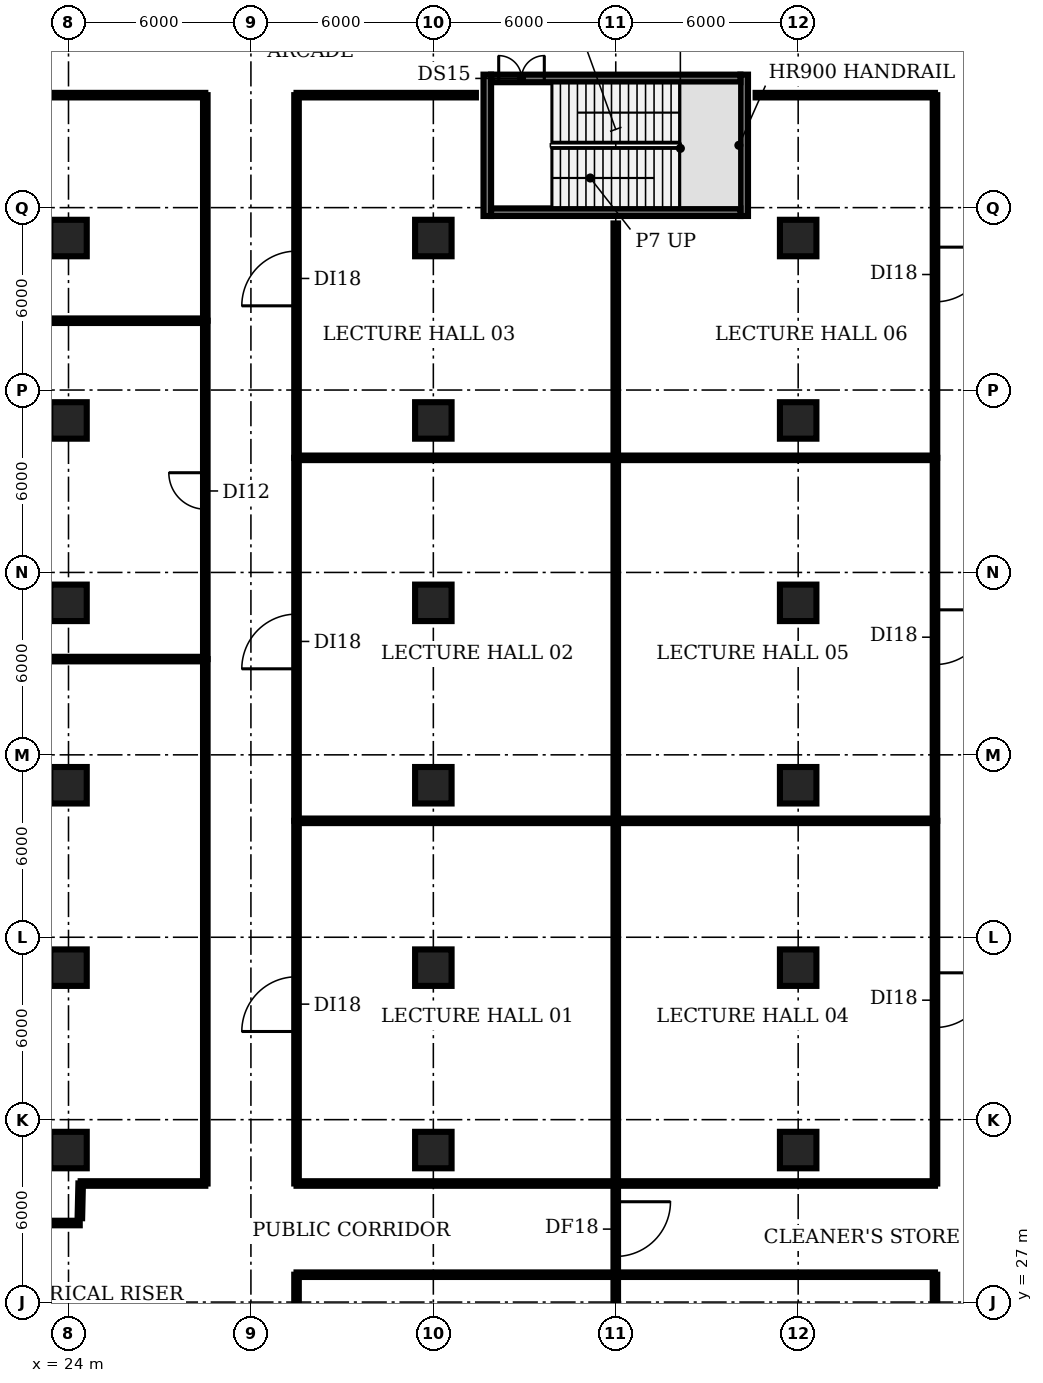
"""IFC4 building model, lengths in metres.
Left out: names, types, materials, properties, quantities, classifications, styles, units other than length and angle.
Written with IfcOpenShell. Run it as: python <this file> out.ifc"""

import sys

from ifc_helpers import new_model, si_unit, direction, frame, frame_2d, origin, origin_2d, place, context, subcontext, project, spatial, rectangle, extrude, element, fill, save


model = new_model("IFC4")
c1 = context("Model", 3, precision=1e-05, world=origin(), true_north=direction((0.0, 1.0)))
c2 = subcontext(c1, "Body", "Model", "MODEL_VIEW")
j1 = project(units=[si_unit("LENGTHUNIT", "METRE"), si_unit("PLANEANGLEUNIT", "RADIAN")], contexts=[c1])
p1 = place(None, origin())
s1 = spatial("IfcSite", under=j1, at=p1, CompositionType="ELEMENT")
p2 = place(p1, origin())
s2 = spatial("IfcBuilding", under=s1, at=p2, CompositionType="ELEMENT")
p3 = place(p2, origin())
s3 = spatial("IfcBuildingStorey", under=s2, at=p3, CompositionType="ELEMENT", Elevation=0.0)
for number, where, z_axis, x_axis in (
    (1, (24.0, 32.0, 0.0), (0.0, 0.0, 1.0), (1.0, 0.0, 0.0)),
    (2, (24.0, 38.0, 0.0), (0.0, 0.0, 1.0), (1.0, 0.0, 0.0)),
    (3, (24.0, 44.0, 0.0), (0.0, 0.0, 1.0), (1.0, 0.0, 0.0)),
    (4, (24.0, 50.0, 0.0), (0.0, 0.0, 1.0), (1.0, 0.0, 0.0)),
    (5, (24.0, 56.0, 0.0), (0.0, 0.0, 1.0), (1.0, 0.0, 0.0)),
    (6, (24.0, 62.0, 0.0), (0.0, 0.0, 1.0), (1.0, 0.0, 0.0)),
    (7, (36.0, 32.0, 0.0), (0.0, 0.0, 1.0), (1.0, 0.0, 0.0)),
    (8, (36.0, 38.0, 0.0), (0.0, 0.0, 1.0), (1.0, 0.0, 0.0)),
    (9, (36.0, 44.0, 0.0), (0.0, 0.0, 1.0), (1.0, 0.0, 0.0)),
    (10, (36.0, 50.0, 0.0), (0.0, 0.0, 1.0), (1.0, 0.0, 0.0)),
    (11, (36.0, 56.0, 0.0), (0.0, 0.0, 1.0), (1.0, 0.0, 0.0)),
    (12, (36.0, 62.0, 0.0), (0.0, 0.0, 1.0), (1.0, 0.0, 0.0)),
    (13, (48.0, 32.0, 0.0), (0.0, 0.0, 1.0), (1.0, 0.0, 0.0)),
    (14, (48.0, 38.0, 0.0), (0.0, 0.0, 1.0), (1.0, 0.0, 0.0)),
    (15, (48.0, 44.0, 0.0), (0.0, 0.0, 1.0), (1.0, 0.0, 0.0)),
    (16, (48.0, 50.0, 0.0), (0.0, 0.0, 1.0), (1.0, 0.0, 0.0)),
    (17, (48.0, 56.0, 0.0), (0.0, 0.0, 1.0), (1.0, 0.0, 0.0)),
    (18, (48.0, 62.0, 0.0), (0.0, 0.0, 1.0), (1.0, 0.0, 0.0)),
):
    element("IfcColumn", number, at=place(p3, frame(where, z_axis=z_axis, x_axis=x_axis)), inside=s3, PredefinedType="COLUMN", context=c2, shape_type="SweptSolid", body=[
        extrude(rectangle(XDim=1.2, YDim=1.2, at=origin_2d()), origin(), (0.0, 0.0, 1.0), 5.65),
    ])
for number, where, z_axis, x_axis in (
    (19, (37.775, 62.725, 0.0), (0.0, 0.0, 1.0), (0.0, 1.0, 0.0)),
    (20, (46.225, 62.725, 0.0), (0.0, 0.0, 1.0), (0.0, 1.0, 0.0)),
):
    element("IfcWall", number, at=place(p3, frame(where, z_axis=z_axis, x_axis=x_axis)), inside=s3, PredefinedType="SHEAR", context=c2, shape_type="SweptSolid", body=[
        extrude(rectangle(XDim=4.65, YDim=0.25, at=frame_2d((2.325, 0.0))), origin(), (0.0, 0.0, 1.0), 5.65),
    ])
p4 = place(p3, frame((37.9, 62.85, 0.0), z_axis=(0.0, 0.0, 1.0), x_axis=(1.0, 0.0, 0.0)))
e21 = element("IfcWall", 21, at=p4, inside=s3, PredefinedType="SHEAR", context=c2, shape_type="SweptSolid", body=[
    extrude(rectangle(XDim=8.2, YDim=0.25, at=frame_2d((4.1, 0.0))), origin(), (0.0, 0.0, 1.0), 5.65),
])
p5 = place(p3, frame((37.9, 67.25, 0.0), z_axis=(0.0, 0.0, 1.0), x_axis=(1.0, 0.0, 0.0)))
e22 = element("IfcWall", 22, at=p5, inside=s3, PredefinedType="SHEAR", context=c2, shape_type="SweptSolid", body=[
    extrude(rectangle(XDim=8.2, YDim=0.25, at=frame_2d((4.1, 0.0))), origin(), (0.0, 0.0, 1.0), 5.65),
])
p6 = place(p5, frame((0.25, 0.0, 0.0)))
e23 = element("IfcOpeningElement", 23, at=p6, cuts=e22, PredefinedType="OPENING", context=c2, shape_type="SweptSolid", body=[
    extrude(rectangle(XDim=1.5, YDim=2.1, at=frame_2d((0.75, 1.05))), frame((0.0, 0.135, 0.0), z_axis=(0.0, -1.0, 0.0), x_axis=(1.0, 0.0, 0.0)), (0.0, 0.0, 1.0), 0.27),
])
p7 = place(p3, frame((-3.7, 48.15, 0.0), z_axis=(0.0, 0.0, 1.0), x_axis=(1.0, 0.0, 0.0)))
e24 = element("IfcWall", 24, at=p7, inside=s3, PredefinedType="PARTITIONING", context=c2, shape_type="SweptSolid", body=[
    extrude(rectangle(XDim=32.2, YDim=0.15, at=frame_2d((16.1, 0.0))), origin(), (0.0, 0.0, 1.0), 4.53),
])
p8 = place(p3, frame((5.4, 59.28, 0.0), z_axis=(0.0, 0.0, 1.0), x_axis=(1.0, 0.0, 0.0)))
e25 = element("IfcWall", 25, at=p8, inside=s3, PredefinedType="PARTITIONING", context=c2, shape_type="SweptSolid", body=[
    extrude(rectangle(XDim=23.1, YDim=0.15, at=frame_2d((11.55, 0.0))), origin(), (0.0, 0.0, 1.0), 4.53),
])
p9 = place(p3, frame((5.63, 29.6, 0.0), z_axis=(0.0, 0.0, 1.0), x_axis=(1.0, 0.0, 0.0)))
e26 = element("IfcWall", 26, at=p9, inside=s3, PredefinedType="PARTITIONING", context=c2, shape_type="SweptSolid", body=[
    extrude(rectangle(XDim=18.74, YDim=0.15, at=frame_2d((9.37, 0.0))), origin(), (0.0, 0.0, 1.0), 4.53),
])
p10 = place(p9, frame((8.34, 0.0, 0.0)))
e27 = element("IfcOpeningElement", 27, at=p10, cuts=e26, PredefinedType="OPENING", context=c2, shape_type="SweptSolid", body=[
    extrude(rectangle(XDim=1.8, YDim=2.1, at=frame_2d((0.9, 1.05))), frame((0.0, 0.085, 0.0), z_axis=(0.0, -1.0, 0.0), x_axis=(1.0, 0.0, 0.0)), (0.0, 0.0, 1.0), 0.17),
])
p11 = place(p3, frame((24.374, 29.76, 0.0), z_axis=(0.0, 0.0, 1.0), x_axis=(0.022906193834, 0.99973761872, 0.0)))
e28 = element("IfcWall", 28, at=p11, inside=s3, PredefinedType="PARTITIONING", context=c2, shape_type="SweptSolid", body=[
    extrude(rectangle(XDim=1.14, YDim=0.15, at=frame_2d((0.57, 0.0))), origin(), (0.0, 0.0, 1.0), 4.53),
])
p12 = place(p3, frame((24.4, 30.9, 0.0), z_axis=(0.0, 0.0, 1.0), x_axis=(1.0, 0.0, 0.0)))
e29 = element("IfcWall", 29, at=p12, inside=s3, PredefinedType="PARTITIONING", context=c2, shape_type="SweptSolid", body=[
    extrude(rectangle(XDim=4.1, YDim=0.15, at=frame_2d((2.05, 0.0))), origin(), (0.0, 0.0, 1.0), 4.53),
])
p13 = place(p3, frame((28.5, 30.9, 0.0), z_axis=(0.0, 0.0, 1.0), x_axis=(0.0, 1.0, 0.0)))
e30 = element("IfcWall", 30, at=p13, inside=s3, PredefinedType="PARTITIONING", context=c2, shape_type="SweptSolid", body=[
    extrude(rectangle(XDim=17.25, YDim=0.15, at=frame_2d((8.625, 0.0))), origin(), (0.0, 0.0, 1.0), 4.53),
])
p14 = place(p3, frame((28.5, 48.15, 0.0), z_axis=(0.0, 0.0, 1.0), x_axis=(0.0, 1.0, 0.0)))
e31 = element("IfcWall", 31, at=p14, inside=s3, PredefinedType="PARTITIONING", context=c2, shape_type="SweptSolid", body=[
    extrude(rectangle(XDim=11.13, YDim=0.15, at=frame_2d((5.565, 0.0))), origin(), (0.0, 0.0, 1.0), 4.53),
])
p15 = place(p14, frame((4.93, 0.0, 0.0)))
e32 = element("IfcOpeningElement", 32, at=p15, cuts=e31, PredefinedType="OPENING", context=c2, shape_type="SweptSolid", body=[
    extrude(rectangle(XDim=1.2, YDim=2.1, at=frame_2d((0.6, 1.05))), frame((0.0, 0.085, 0.0), z_axis=(0.0, -1.0, 0.0), x_axis=(1.0, 0.0, 0.0)), (0.0, 0.0, 1.0), 0.17),
])
p16 = place(p3, frame((28.5, 59.28, 0.0), z_axis=(0.0, 0.0, 1.0), x_axis=(0.0, 1.0, 0.0)))
e33 = element("IfcWall", 33, at=p16, inside=s3, PredefinedType="PARTITIONING", context=c2, shape_type="SweptSolid", body=[
    extrude(rectangle(XDim=7.42, YDim=0.15, at=frame_2d((3.71, 0.0))), origin(), (0.0, 0.0, 1.0), 4.53),
])
p17 = place(p3, frame((28.5, 66.7, 0.0), z_axis=(0.0, 0.0, 1.0), x_axis=(-1.0, 0.0, 0.0)))
e34 = element("IfcWall", 34, at=p17, inside=s3, PredefinedType="PARTITIONING", context=c2, shape_type="SweptSolid", body=[
    extrude(rectangle(XDim=27.55, YDim=0.15, at=frame_2d((13.775, 0.0))), origin(), (0.0, 0.0, 1.0), 4.53),
])
p18 = place(p17, frame((13.25, 0.0, 0.0)))
e35 = element("IfcOpeningElement", 35, at=p18, cuts=e34, PredefinedType="OPENING", context=c2, shape_type="SweptSolid", body=[
    extrude(rectangle(XDim=1.2, YDim=2.1, at=frame_2d((0.6, 1.05))), frame((0.0, 0.085, 0.0), z_axis=(0.0, -1.0, 0.0), x_axis=(1.0, 0.0, 0.0)), (0.0, 0.0, 1.0), 0.17),
])
p19 = place(p3, frame((31.5, 19.52, 0.0), z_axis=(0.0, 0.0, 1.0), x_axis=(0.0, 1.0, 0.0)))
e36 = element("IfcWall", 36, at=p19, inside=s3, PredefinedType="PARTITIONING", context=c2, shape_type="SweptSolid", body=[
    extrude(rectangle(XDim=8.38, YDim=0.15, at=frame_2d((4.19, 0.0))), origin(), (0.0, 0.0, 1.0), 4.53),
])
p20 = place(p3, frame((31.5, 27.9, 0.0), z_axis=(0.0, 0.0, 1.0), x_axis=(1.0, 0.0, 0.0)))
e37 = element("IfcWall", 37, at=p20, inside=s3, PredefinedType="PARTITIONING", context=c2, shape_type="SweptSolid", body=[
    extrude(rectangle(XDim=21.0, YDim=0.15, at=frame_2d((10.5, 0.0))), origin(), (0.0, 0.0, 1.0), 4.53),
])
p21 = place(p3, frame((31.5, 30.9, 0.0), z_axis=(0.0, 0.0, 1.0), x_axis=(0.0, 1.0, 0.0)))
e38 = element("IfcWall", 38, at=p21, inside=s3, PredefinedType="PARTITIONING", context=c2, shape_type="SweptSolid", body=[
    extrude(rectangle(XDim=11.93, YDim=0.15, at=frame_2d((5.965, 0.0))), origin(), (0.0, 0.0, 1.0), 4.53),
])
p22 = place(p21, frame((5.0, 0.0, 0.0)))
e39 = element("IfcOpeningElement", 39, at=p22, cuts=e38, PredefinedType="OPENING", context=c2, shape_type="SweptSolid", body=[
    extrude(rectangle(XDim=1.8, YDim=2.1, at=frame_2d((0.9, 1.05))), frame((0.0, 0.085, 0.0), z_axis=(0.0, -1.0, 0.0), x_axis=(1.0, 0.0, 0.0)), (0.0, 0.0, 1.0), 0.17),
])
p23 = place(p3, frame((31.5, 30.9, 0.0), z_axis=(0.0, 0.0, 1.0), x_axis=(1.0, 0.0, 0.0)))
e40 = element("IfcWall", 40, at=p23, inside=s3, PredefinedType="PARTITIONING", context=c2, shape_type="SweptSolid", body=[
    extrude(rectangle(XDim=21.0, YDim=0.15, at=frame_2d((10.5, 0.0))), origin(), (0.0, 0.0, 1.0), 4.53),
])
p24 = place(p3, frame((31.5, 42.83, 0.0), z_axis=(0.0, 0.0, 1.0), x_axis=(0.0, 1.0, 0.0)))
e41 = element("IfcWall", 41, at=p24, inside=s3, PredefinedType="PARTITIONING", context=c2, shape_type="SweptSolid", body=[
    extrude(rectangle(XDim=11.94, YDim=0.15, at=frame_2d((5.97, 0.0))), origin(), (0.0, 0.0, 1.0), 4.53),
])
p25 = place(p24, frame((5.0, 0.0, 0.0)))
e42 = element("IfcOpeningElement", 42, at=p25, cuts=e41, PredefinedType="OPENING", context=c2, shape_type="SweptSolid", body=[
    extrude(rectangle(XDim=1.8, YDim=2.1, at=frame_2d((0.9, 1.05))), frame((0.0, 0.085, 0.0), z_axis=(0.0, -1.0, 0.0), x_axis=(1.0, 0.0, 0.0)), (0.0, 0.0, 1.0), 0.17),
])
p26 = place(p3, frame((31.5, 42.83, 0.0), z_axis=(0.0, 0.0, 1.0), x_axis=(1.0, 0.0, 0.0)))
e43 = element("IfcWall", 43, at=p26, inside=s3, PredefinedType="PARTITIONING", context=c2, shape_type="SweptSolid", body=[
    extrude(rectangle(XDim=21.0, YDim=0.15, at=frame_2d((10.5, 0.0))), origin(), (0.0, 0.0, 1.0), 4.53),
])
p27 = place(p3, frame((31.5, 54.77, 0.0), z_axis=(0.0, 0.0, 1.0), x_axis=(0.0, 1.0, 0.0)))
e44 = element("IfcWall", 44, at=p27, inside=s3, PredefinedType="PARTITIONING", context=c2, shape_type="SweptSolid", body=[
    extrude(rectangle(XDim=11.93, YDim=0.15, at=frame_2d((5.965, 0.0))), origin(), (0.0, 0.0, 1.0), 4.53),
])
p28 = place(p27, frame((5.0, 0.0, 0.0)))
e45 = element("IfcOpeningElement", 45, at=p28, cuts=e44, PredefinedType="OPENING", context=c2, shape_type="SweptSolid", body=[
    extrude(rectangle(XDim=1.8, YDim=2.1, at=frame_2d((0.9, 1.05))), frame((0.0, 0.085, 0.0), z_axis=(0.0, -1.0, 0.0), x_axis=(1.0, 0.0, 0.0)), (0.0, 0.0, 1.0), 0.17),
])
p29 = place(p3, frame((31.5, 54.77, 0.0), z_axis=(0.0, 0.0, 1.0), x_axis=(1.0, 0.0, 0.0)))
e46 = element("IfcWall", 46, at=p29, inside=s3, PredefinedType="PARTITIONING", context=c2, shape_type="SweptSolid", body=[
    extrude(rectangle(XDim=21.0, YDim=0.15, at=frame_2d((10.5, 0.0))), origin(), (0.0, 0.0, 1.0), 4.53),
])
p30 = place(p3, frame((31.5, 66.7, 0.0), z_axis=(0.0, 0.0, 1.0), x_axis=(1.0, 0.0, 0.0)))
e47 = element("IfcWall", 47, at=p30, inside=s3, PredefinedType="PARTITIONING", context=c2, shape_type="SweptSolid", body=[
    extrude(rectangle(XDim=5.9, YDim=0.15, at=frame_2d((2.95, 0.0))), origin(), (0.0, 0.0, 1.0), 4.53),
])
p31 = place(p3, frame((42.0, -4.5, 0.0), z_axis=(0.0, 0.0, 1.0), x_axis=(0.0, 1.0, 0.0)))
e48 = element("IfcWall", 48, at=p31, inside=s3, PredefinedType="PARTITIONING", context=c2, shape_type="SweptSolid", body=[
    extrude(rectangle(XDim=32.4, YDim=0.15, at=frame_2d((16.2, 0.0))), origin(), (0.0, 0.0, 1.0), 4.53),
])
p32 = place(p3, frame((42.0, 30.9, 0.0), z_axis=(0.0, 0.0, 1.0), x_axis=(0.0, -1.0, 0.0)))
e49 = element("IfcWall", 49, at=p32, inside=s3, PredefinedType="PARTITIONING", context=c2, shape_type="SweptSolid", body=[
    extrude(rectangle(XDim=3.0, YDim=0.15, at=frame_2d((1.5, 0.0))), origin(), (0.0, 0.0, 1.0), 4.53),
])
p33 = place(p32, frame((0.6, 0.0, 0.0)))
e50 = element("IfcOpeningElement", 50, at=p33, cuts=e49, PredefinedType="OPENING", context=c2, shape_type="SweptSolid", body=[
    extrude(rectangle(XDim=1.8, YDim=2.1, at=frame_2d((0.9, 1.05))), frame((0.0, 0.085, 0.0), z_axis=(0.0, -1.0, 0.0), x_axis=(1.0, 0.0, 0.0)), (0.0, 0.0, 1.0), 0.17),
])
p34 = place(p3, frame((42.0, 30.9, 0.0), z_axis=(0.0, 0.0, 1.0), x_axis=(0.0, 1.0, 0.0)))
e51 = element("IfcWall", 51, at=p34, inside=s3, PredefinedType="PARTITIONING", context=c2, shape_type="SweptSolid", body=[
    extrude(rectangle(XDim=31.58, YDim=0.15, at=frame_2d((15.79, 0.0))), origin(), (0.0, 0.0, 1.0), 4.53),
])
p35 = place(p3, frame((46.6, 66.7, 0.0), z_axis=(0.0, 0.0, 1.0), x_axis=(1.0, 0.0, 0.0)))
e52 = element("IfcWall", 52, at=p35, inside=s3, PredefinedType="PARTITIONING", context=c2, shape_type="SweptSolid", body=[
    extrude(rectangle(XDim=5.9, YDim=0.15, at=frame_2d((2.95, 0.0))), origin(), (0.0, 0.0, 1.0), 4.53),
])
p36 = place(p3, frame((52.5, 27.9, 0.0), z_axis=(0.0, 0.0, 1.0), x_axis=(0.0, -1.0, 0.0)))
e53 = element("IfcWall", 53, at=p36, inside=s3, PredefinedType="PARTITIONING", context=c2, shape_type="SweptSolid", body=[
    extrude(rectangle(XDim=31.82, YDim=0.15, at=frame_2d((15.91, 0.0))), origin(), (0.0, 0.0, 1.0), 4.53),
])
p37 = place(p36, frame((14.9, 0.0, 0.0)))
e54 = element("IfcOpeningElement", 54, at=p37, cuts=e53, PredefinedType="OPENING", context=c2, shape_type="SweptSolid", body=[
    extrude(rectangle(XDim=1.8, YDim=2.1, at=frame_2d((0.9, 1.05))), frame((0.0, 0.085, 0.0), z_axis=(0.0, -1.0, 0.0), x_axis=(1.0, 0.0, 0.0)), (0.0, 0.0, 1.0), 0.17),
])
p38 = place(p3, frame((52.5, 42.83, 0.0), z_axis=(0.0, 0.0, 1.0), x_axis=(0.0, -1.0, 0.0)))
e55 = element("IfcWall", 55, at=p38, inside=s3, PredefinedType="PARTITIONING", context=c2, shape_type="SweptSolid", body=[
    extrude(rectangle(XDim=11.93, YDim=0.15, at=frame_2d((5.965, 0.0))), origin(), (0.0, 0.0, 1.0), 4.53),
])
p39 = place(p38, frame((5.0, 0.0, 0.0)))
e56 = element("IfcOpeningElement", 56, at=p39, cuts=e55, PredefinedType="OPENING", context=c2, shape_type="SweptSolid", body=[
    extrude(rectangle(XDim=1.8, YDim=2.1, at=frame_2d((0.9, 1.05))), frame((0.0, 0.085, 0.0), z_axis=(0.0, -1.0, 0.0), x_axis=(1.0, 0.0, 0.0)), (0.0, 0.0, 1.0), 0.17),
])
p40 = place(p3, frame((52.5, 54.77, 0.0), z_axis=(0.0, 0.0, 1.0), x_axis=(0.0, -1.0, 0.0)))
e57 = element("IfcWall", 57, at=p40, inside=s3, PredefinedType="PARTITIONING", context=c2, shape_type="SweptSolid", body=[
    extrude(rectangle(XDim=11.94, YDim=0.15, at=frame_2d((5.97, 0.0))), origin(), (0.0, 0.0, 1.0), 4.53),
])
p41 = place(p40, frame((5.0, 0.0, 0.0)))
e58 = element("IfcOpeningElement", 58, at=p41, cuts=e57, PredefinedType="OPENING", context=c2, shape_type="SweptSolid", body=[
    extrude(rectangle(XDim=1.8, YDim=2.1, at=frame_2d((0.9, 1.05))), frame((0.0, 0.085, 0.0), z_axis=(0.0, -1.0, 0.0), x_axis=(1.0, 0.0, 0.0)), (0.0, 0.0, 1.0), 0.17),
])
p42 = place(p3, frame((52.5, 66.7, 0.0), z_axis=(0.0, 0.0, 1.0), x_axis=(0.0, -1.0, 0.0)))
e59 = element("IfcWall", 59, at=p42, inside=s3, PredefinedType="PARTITIONING", context=c2, shape_type="SweptSolid", body=[
    extrude(rectangle(XDim=11.93, YDim=0.15, at=frame_2d((5.965, 0.0))), origin(), (0.0, 0.0, 1.0), 4.53),
])
p43 = place(p42, frame((5.0, 0.0, 0.0)))
e60 = element("IfcOpeningElement", 60, at=p43, cuts=e59, PredefinedType="OPENING", context=c2, shape_type="SweptSolid", body=[
    extrude(rectangle(XDim=1.8, YDim=2.1, at=frame_2d((0.9, 1.05))), frame((0.0, 0.085, 0.0), z_axis=(0.0, -1.0, 0.0), x_axis=(1.0, 0.0, 0.0)), (0.0, 0.0, 1.0), 0.17),
])
p44 = place(p6, origin())
e61 = element("IfcDoor", 61, at=p44, inside=s3, OperationType="DOUBLE_DOOR_SINGLE_SWING", PredefinedType="DOOR", context=c2, shape_type="SweptSolid", body=[
    extrude(rectangle(XDim=1.5, YDim=2.1, at=frame_2d((0.75, 1.05))), frame((0.0, 0.025, 0.0), z_axis=(0.0, -1.0, 0.0), x_axis=(1.0, 0.0, 0.0)), (0.0, 0.0, 1.0), 0.05),
])
fill(e23, e61)
p45 = place(p15, origin())
e62 = element("IfcDoor", 62, at=p45, inside=s3, OperationType="SINGLE_SWING_RIGHT", PredefinedType="DOOR", context=c2, shape_type="SweptSolid", body=[
    extrude(rectangle(XDim=1.2, YDim=2.1, at=frame_2d((0.6, 1.05))), frame((0.0, 0.025, 0.0), z_axis=(0.0, -1.0, 0.0), x_axis=(1.0, 0.0, 0.0)), (0.0, 0.0, 1.0), 0.05),
])
fill(e32, e62)
p46 = place(p22, origin())
e63 = element("IfcDoor", 63, at=p46, inside=s3, OperationType="SINGLE_SWING_LEFT", PredefinedType="DOOR", context=c2, shape_type="SweptSolid", body=[
    extrude(rectangle(XDim=1.8, YDim=2.1, at=frame_2d((0.9, 1.05))), frame((0.0, 0.025, 0.0), z_axis=(0.0, -1.0, 0.0), x_axis=(1.0, 0.0, 0.0)), (0.0, 0.0, 1.0), 0.05),
])
fill(e39, e63)
p47 = place(p25, origin())
e64 = element("IfcDoor", 64, at=p47, inside=s3, OperationType="SINGLE_SWING_LEFT", PredefinedType="DOOR", context=c2, shape_type="SweptSolid", body=[
    extrude(rectangle(XDim=1.8, YDim=2.1, at=frame_2d((0.9, 1.05))), frame((0.0, 0.025, 0.0), z_axis=(0.0, -1.0, 0.0), x_axis=(1.0, 0.0, 0.0)), (0.0, 0.0, 1.0), 0.05),
])
fill(e42, e64)
p48 = place(p28, origin())
e65 = element("IfcDoor", 65, at=p48, inside=s3, OperationType="SINGLE_SWING_LEFT", PredefinedType="DOOR", context=c2, shape_type="SweptSolid", body=[
    extrude(rectangle(XDim=1.8, YDim=2.1, at=frame_2d((0.9, 1.05))), frame((0.0, 0.025, 0.0), z_axis=(0.0, -1.0, 0.0), x_axis=(1.0, 0.0, 0.0)), (0.0, 0.0, 1.0), 0.05),
])
fill(e45, e65)
p49 = place(p33, origin())
e66 = element("IfcDoor", 66, at=p49, inside=s3, OperationType="SINGLE_SWING_LEFT", PredefinedType="DOOR", context=c2, shape_type="SweptSolid", body=[
    extrude(rectangle(XDim=1.8, YDim=2.1, at=frame_2d((0.9, 1.05))), frame((0.0, 0.025, 0.0), z_axis=(0.0, -1.0, 0.0), x_axis=(1.0, 0.0, 0.0)), (0.0, 0.0, 1.0), 0.05),
])
fill(e50, e66)
p50 = place(p39, origin())
e67 = element("IfcDoor", 67, at=p50, inside=s3, OperationType="SINGLE_SWING_LEFT", PredefinedType="DOOR", context=c2, shape_type="SweptSolid", body=[
    extrude(rectangle(XDim=1.8, YDim=2.1, at=frame_2d((0.9, 1.05))), frame((0.0, 0.025, 0.0), z_axis=(0.0, -1.0, 0.0), x_axis=(1.0, 0.0, 0.0)), (0.0, 0.0, 1.0), 0.05),
])
fill(e56, e67)
p51 = place(p41, origin())
e68 = element("IfcDoor", 68, at=p51, inside=s3, OperationType="SINGLE_SWING_LEFT", PredefinedType="DOOR", context=c2, shape_type="SweptSolid", body=[
    extrude(rectangle(XDim=1.8, YDim=2.1, at=frame_2d((0.9, 1.05))), frame((0.0, 0.025, 0.0), z_axis=(0.0, -1.0, 0.0), x_axis=(1.0, 0.0, 0.0)), (0.0, 0.0, 1.0), 0.05),
])
fill(e58, e68)
p52 = place(p43, origin())
e69 = element("IfcDoor", 69, at=p52, inside=s3, OperationType="SINGLE_SWING_LEFT", PredefinedType="DOOR", context=c2, shape_type="SweptSolid", body=[
    extrude(rectangle(XDim=1.8, YDim=2.1, at=frame_2d((0.9, 1.05))), frame((0.0, 0.025, 0.0), z_axis=(0.0, -1.0, 0.0), x_axis=(1.0, 0.0, 0.0)), (0.0, 0.0, 1.0), 0.05),
])
fill(e60, e69)
save(model, sys.argv[1])
